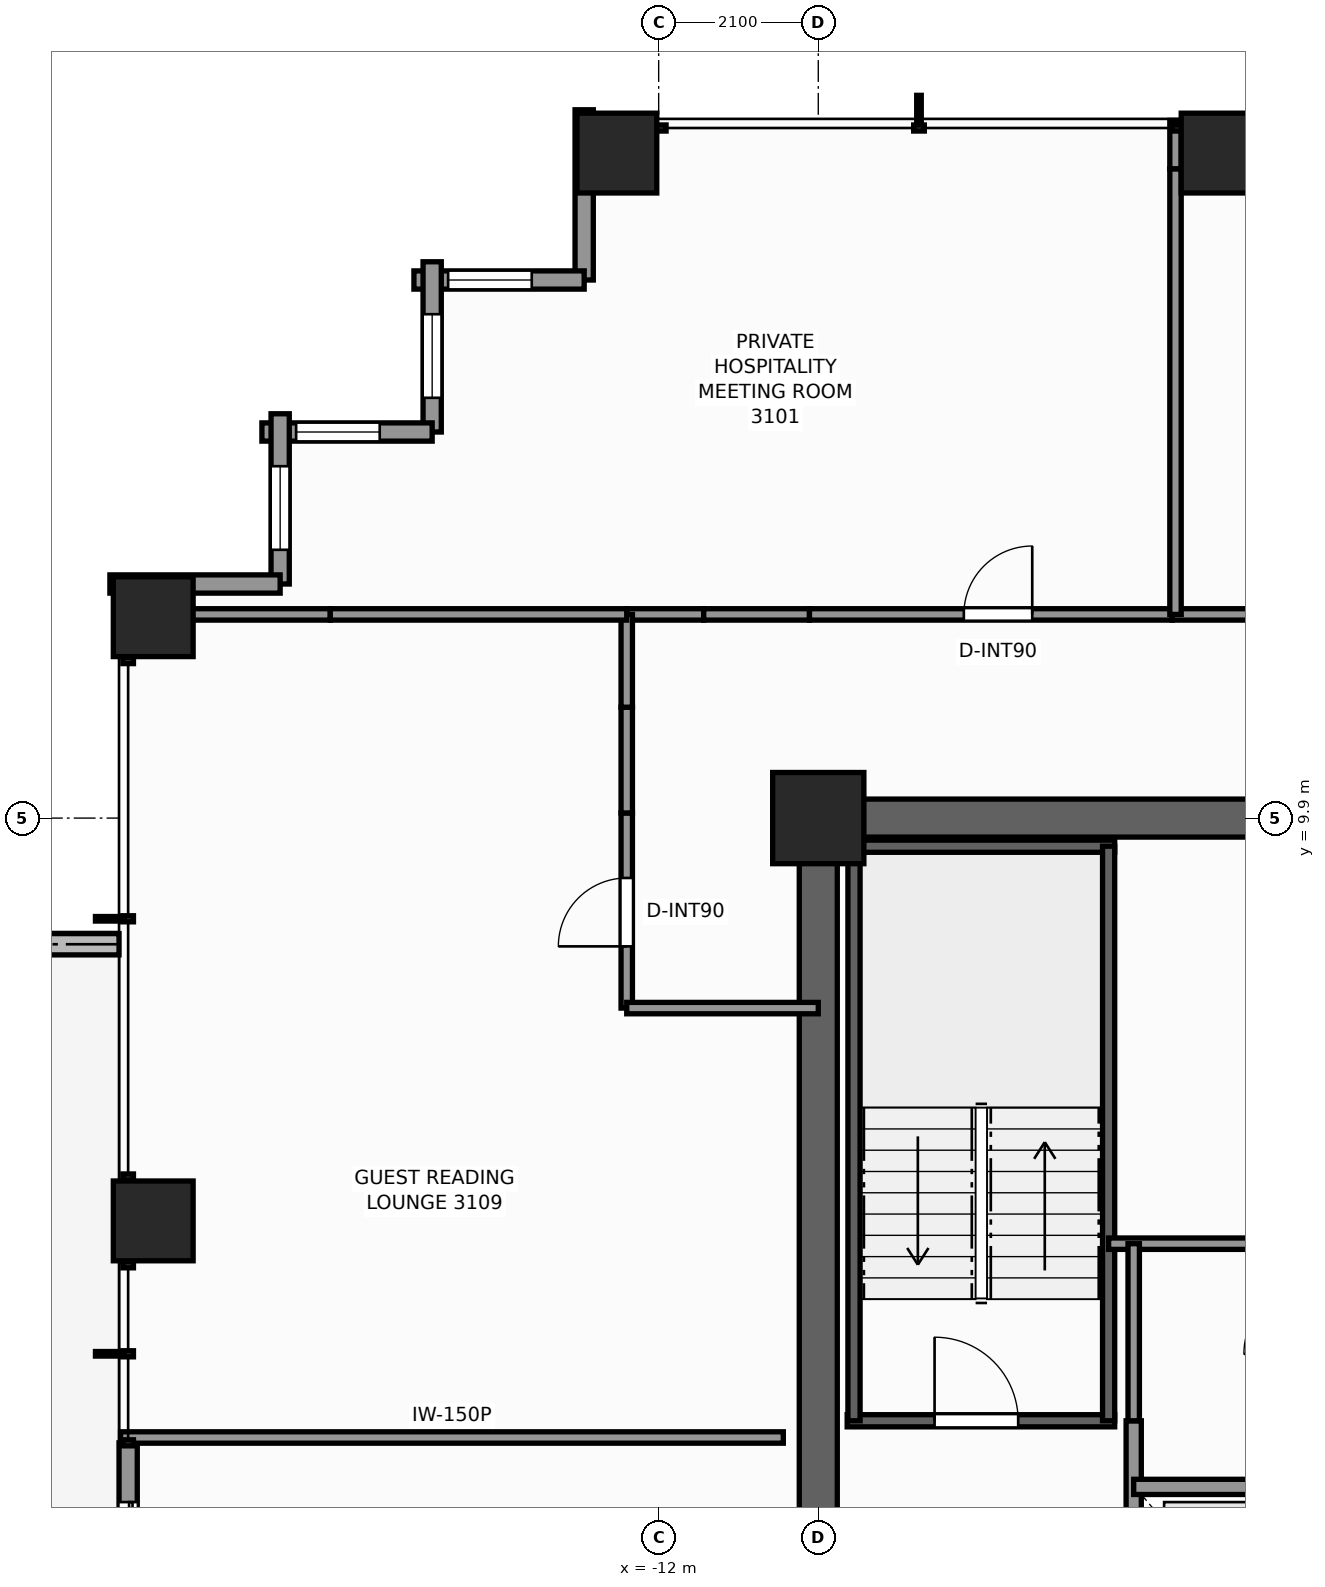
"""IFC4 building model, lengths in metres.
Left out: names, types, materials, properties, quantities, classifications, styles, units other than length and angle.
Written with IfcOpenShell. Run it as: python <this file> out.ifc"""

import sys

from ifc_helpers import new_model, si_unit, direction, frame, frame_2d, origin, origin_2d, place, context, subcontext, project, spatial, rectangle, extrude, element, fill, save


model = new_model("IFC4")
c1 = context("Model", 3, precision=1e-05, world=origin(), true_north=direction((0.0, 1.0)))
c2 = subcontext(c1, "Body", "Model", "MODEL_VIEW")
j1 = project(units=[si_unit("LENGTHUNIT", "METRE"), si_unit("PLANEANGLEUNIT", "RADIAN")], contexts=[c1])
p1 = place(None, origin())
s1 = spatial("IfcSite", under=j1, at=p1, CompositionType="ELEMENT")
p2 = place(p1, origin())
s2 = spatial("IfcBuilding", under=s1, at=p2, CompositionType="ELEMENT")
p3 = place(p2, frame((0.0, 0.0, 108.5)))
s3 = spatial("IfcBuildingStorey", under=s2, at=p3, CompositionType="ELEMENT", Elevation=108.5)
p4 = place(p3, frame((-10.15, 9.9, 0.0), z_axis=(0.0, 0.0, 1.0), x_axis=(1.0, 0.0, 0.0)))
e1 = element("IfcWall", 1, at=p4, inside=s3, PredefinedType="SHEAR", context=c2, shape_type="SweptSolid", body=[
    extrude(rectangle(XDim=14.57, YDim=0.5, at=frame_2d((7.285, 0.0))), origin(), (0.0, 0.0, 1.0), 3.3),
])
p5 = place(p3, frame((-9.9, -3.7, 0.0), z_axis=(0.0, 0.0, 1.0), x_axis=(0.0, 1.0, 0.0)))
e2 = element("IfcWall", 2, at=p5, inside=s3, PredefinedType="SHEAR", context=c2, shape_type="SweptSolid", body=[
    extrude(rectangle(XDim=13.35, YDim=0.5, at=frame_2d((6.675, 0.0))), origin(), (0.0, 0.0, 1.0), 3.3),
])
p6 = place(p5, frame((0.35, 0.0, 0.0)))
e3 = element("IfcOpeningElement", 3, at=p6, cuts=e2, PredefinedType="OPENING", context=c2, shape_type="SweptSolid", body=[
    extrude(rectangle(XDim=1.1, YDim=2.2, at=frame_2d((0.55, 1.1))), frame((0.0, 0.26, 0.0), z_axis=(0.0, -1.0, 0.0), x_axis=(1.0, 0.0, 0.0)), (0.0, 0.0, 1.0), 0.52),
])
p7 = place(p3, frame((-9.9, 9.9, 0.0), z_axis=(0.0, 0.0, 1.0), x_axis=(1.0, 0.0, 0.0)))
e4 = element("IfcColumn", 4, at=p7, inside=s3, PredefinedType="COLUMN", context=c2, shape_type="SweptSolid", body=[
    extrude(rectangle(XDim=1.2, YDim=1.2, at=origin_2d()), origin(), (0.0, 0.0, 1.0), 3.3),
])
for number, where, z_axis, x_axis in (
    (5, (-12.55, 18.65, 0.0), (0.0, 0.0, 1.0), (1.0, 0.0, 0.0)),
    (6, (-4.6, 18.65, 0.0), (0.0, 0.0, 1.0), (1.0, 0.0, 0.0)),
    (7, (-18.65, 4.6, 0.0), (0.0, 0.0, 1.0), (1.0, 0.0, 0.0)),
    (8, (-18.65, 12.55, 0.0), (0.0, 0.0, 1.0), (1.0, 0.0, 0.0)),
):
    element("IfcColumn", number, at=place(p3, frame(where, z_axis=z_axis, x_axis=x_axis)), inside=s3, PredefinedType="COLUMN", context=c2, shape_type="SweptSolid", body=[
        extrude(rectangle(XDim=1.05, YDim=1.05, at=origin_2d()), origin(), (0.0, 0.0, 1.0), 3.3),
    ])
p8 = place(p3, frame((-19.1, 8.24, -0.04), z_axis=(0.0, 0.0, 1.0), x_axis=(-1.0, 0.0, 0.0)))
e9 = element("IfcWall", 9, at=p8, inside=s3, PredefinedType="PARAPET", context=c2, shape_type="SweptSolid", body=[
    extrude(rectangle(XDim=1.26, YDim=0.28, at=frame_2d((0.63, 0.0))), origin(), (0.0, 0.0, 1.0), 0.42),
])
p9 = place(p3, frame((-12.98, 16.98, 0.0), z_axis=(0.0, 0.0, 1.0), x_axis=(0.0, 1.0, 0.0)))
e10 = element("IfcWall", 10, at=p9, inside=s3, PredefinedType="STANDARD", context=c2, shape_type="SweptSolid", body=[
    extrude(rectangle(XDim=2.24, YDim=0.24, at=frame_2d((1.12, 0.0))), origin(), (0.0, 0.0, 1.0), 1.275),
])
p10 = place(p3, frame((-15.22, 16.98, 0.0), z_axis=(0.0, 0.0, 1.0), x_axis=(1.0, 0.0, 0.0)))
e11 = element("IfcWall", 11, at=p10, inside=s3, PredefinedType="STANDARD", context=c2, shape_type="SweptSolid", body=[
    extrude(rectangle(XDim=2.24, YDim=0.24, at=frame_2d((1.12, 0.0))), origin(), (0.0, 0.0, 1.0), 2.459),
])
p11 = place(p10, frame((0.45, 0.0, 0.65)))
e12 = element("IfcOpeningElement", 12, at=p11, cuts=e11, PredefinedType="OPENING", context=c2, shape_type="SweptSolid", body=[
    extrude(rectangle(XDim=1.1, YDim=1.45, at=frame_2d((0.55, 0.725))), frame((0.0, 0.13, 0.0), z_axis=(0.0, -1.0, 0.0), x_axis=(1.0, 0.0, 0.0)), (0.0, 0.0, 1.0), 0.26),
])
p12 = place(p3, frame((-14.98, 14.98, 0.0), z_axis=(0.0, 0.0, 1.0), x_axis=(0.0, 1.0, 0.0)))
e13 = element("IfcWall", 13, at=p12, inside=s3, PredefinedType="STANDARD", context=c2, shape_type="SweptSolid", body=[
    extrude(rectangle(XDim=2.24, YDim=0.24, at=frame_2d((1.12, 0.0))), origin(), (0.0, 0.0, 1.0), 2.459),
])
p13 = place(p12, frame((0.45, 0.0, 0.65)))
e14 = element("IfcOpeningElement", 14, at=p13, cuts=e13, PredefinedType="OPENING", context=c2, shape_type="SweptSolid", body=[
    extrude(rectangle(XDim=1.1, YDim=1.45, at=frame_2d((0.55, 0.725))), frame((0.0, 0.13, 0.0), z_axis=(0.0, -1.0, 0.0), x_axis=(1.0, 0.0, 0.0)), (0.0, 0.0, 1.0), 0.26),
])
p14 = place(p3, frame((-17.22, 14.98, 0.0), z_axis=(0.0, 0.0, 1.0), x_axis=(1.0, 0.0, 0.0)))
e15 = element("IfcWall", 15, at=p14, inside=s3, PredefinedType="STANDARD", context=c2, shape_type="SweptSolid", body=[
    extrude(rectangle(XDim=2.24, YDim=0.24, at=frame_2d((1.12, 0.0))), origin(), (0.0, 0.0, 1.0), 2.459),
])
p15 = place(p14, frame((0.45, 0.0, 0.65)))
e16 = element("IfcOpeningElement", 16, at=p15, cuts=e15, PredefinedType="OPENING", context=c2, shape_type="SweptSolid", body=[
    extrude(rectangle(XDim=1.1, YDim=1.45, at=frame_2d((0.55, 0.725))), frame((0.0, 0.13, 0.0), z_axis=(0.0, -1.0, 0.0), x_axis=(1.0, 0.0, 0.0)), (0.0, 0.0, 1.0), 0.26),
])
p16 = place(p3, frame((-16.98, 12.98, 0.0), z_axis=(0.0, 0.0, 1.0), x_axis=(0.0, 1.0, 0.0)))
e17 = element("IfcWall", 17, at=p16, inside=s3, PredefinedType="STANDARD", context=c2, shape_type="SweptSolid", body=[
    extrude(rectangle(XDim=2.24, YDim=0.24, at=frame_2d((1.12, 0.0))), origin(), (0.0, 0.0, 1.0), 2.459),
])
p17 = place(p16, frame((0.45, 0.0, 0.65)))
e18 = element("IfcOpeningElement", 18, at=p17, cuts=e17, PredefinedType="OPENING", context=c2, shape_type="SweptSolid", body=[
    extrude(rectangle(XDim=1.1, YDim=1.45, at=frame_2d((0.55, 0.725))), frame((0.0, 0.13, 0.0), z_axis=(0.0, -1.0, 0.0), x_axis=(1.0, 0.0, 0.0)), (0.0, 0.0, 1.0), 0.26),
])
p18 = place(p3, frame((-19.22, 12.98, 0.0), z_axis=(0.0, 0.0, 1.0), x_axis=(1.0, 0.0, 0.0)))
e19 = element("IfcWall", 19, at=p18, inside=s3, PredefinedType="STANDARD", context=c2, shape_type="SweptSolid", body=[
    extrude(rectangle(XDim=2.24, YDim=0.24, at=frame_2d((1.12, 0.0))), origin(), (0.0, 0.0, 1.0), 1.275),
])
p19 = place(p3, frame((-18.98, -1.68, 0.0), z_axis=(0.0, 0.0, 1.0), x_axis=(0.0, 1.0, 0.0)))
e20 = element("IfcWall", 20, at=p19, inside=s3, PredefinedType="STANDARD", context=c2, shape_type="SweptSolid", body=[
    extrude(rectangle(XDim=3.36, YDim=0.24, at=frame_2d((1.68, 0.0))), origin(), (0.0, 0.0, 1.0), 3.08),
])
p20 = place(p19, frame((0.78, 0.0, 0.0)))
e21 = element("IfcOpeningElement", 21, at=p20, cuts=e20, PredefinedType="OPENING", context=c2, shape_type="SweptSolid", body=[
    extrude(rectangle(XDim=1.8, YDim=2.2, at=frame_2d((0.9, 1.1))), frame((0.0, 0.13, 0.0), z_axis=(0.0, -1.0, 0.0), x_axis=(1.0, 0.0, 0.0)), (0.0, 0.0, 1.0), 0.26),
])
p21 = place(p3, frame((-9.52, 1.97, 0.0), z_axis=(0.0, 0.0, 1.0), x_axis=(1.0, 0.0, 0.0)))
e22 = element("IfcWall", 22, at=p21, inside=s3, PredefinedType="SHEAR", context=c2, shape_type="SweptSolid", body=[
    extrude(rectangle(XDim=3.52, YDim=0.16, at=frame_2d((1.76, 0.0))), origin(), (0.0, 0.0, 1.0), 3.3),
])
p22 = place(p21, frame((1.15, 0.0, 0.0)))
e23 = element("IfcOpeningElement", 23, at=p22, cuts=e22, PredefinedType="OPENING", context=c2, shape_type="SweptSolid", body=[
    extrude(rectangle(XDim=1.1, YDim=2.2, at=frame_2d((0.55, 1.1))), frame((0.0, 0.09, 0.0), z_axis=(0.0, -1.0, 0.0), x_axis=(1.0, 0.0, 0.0)), (0.0, 0.0, 1.0), 0.18),
])
p23 = place(p3, frame((-9.52, 9.53, 0.0), z_axis=(0.0, 0.0, 1.0), x_axis=(1.0, 0.0, 0.0)))
e24 = element("IfcWall", 24, at=p23, inside=s3, PredefinedType="SHEAR", context=c2, shape_type="SweptSolid", body=[
    extrude(rectangle(XDim=3.52, YDim=0.16, at=frame_2d((1.76, 0.0))), origin(), (0.0, 0.0, 1.0), 3.3),
])
for number, where, z_axis, x_axis in (
    (25, (-9.43, 1.97, 0.0), (0.0, 0.0, 1.0), (0.0, 1.0, 0.0)),
    (26, (-6.08, 1.97, 0.0), (0.0, 0.0, 1.0), (0.0, 1.0, 0.0)),
):
    element("IfcWall", number, at=place(p3, frame(where, z_axis=z_axis, x_axis=x_axis)), inside=s3, PredefinedType="SHEAR", context=c2, shape_type="SweptSolid", body=[
        extrude(rectangle(XDim=7.56, YDim=0.16, at=frame_2d((3.78, 0.0))), origin(), (0.0, 0.0, 1.0), 3.3),
    ])
p24 = place(p3, frame((-5.75, -3.6, 0.0), z_axis=(0.0, 0.0, 1.0), x_axis=(0.0, 1.0, 0.0)))
e27 = element("IfcWall", 27, at=p24, inside=s3, PredefinedType="SOLIDWALL", context=c2, shape_type="SweptSolid", body=[
    extrude(rectangle(XDim=5.57, YDim=0.2, at=frame_2d((2.785, 0.0))), origin(), (0.0, 0.0, 1.0), 2.715),
])
p25 = place(p24, frame((2.75, 0.0, 0.0)))
e28 = element("IfcOpeningElement", 28, at=p25, cuts=e27, PredefinedType="OPENING", context=c2, shape_type="SweptSolid", body=[
    extrude(rectangle(XDim=1.1, YDim=2.2, at=frame_2d((0.55, 1.1))), frame((0.0, 0.11, 0.0), z_axis=(0.0, -1.0, 0.0), x_axis=(1.0, 0.0, 0.0)), (0.0, 0.0, 1.0), 0.22),
])
p26 = place(p3, frame((-5.75, 1.1, 0.0), z_axis=(0.0, 0.0, 1.0), x_axis=(1.0, 0.0, 0.0)))
e29 = element("IfcWall", 29, at=p26, inside=s3, PredefinedType="SOLIDWALL", context=c2, shape_type="SweptSolid", body=[
    extrude(rectangle(XDim=2.4, YDim=0.2, at=frame_2d((1.2, 0.0))), origin(), (0.0, 0.0, 1.0), 3.08),
])
p27 = place(p3, frame((-6.08, 4.3, 0.0), z_axis=(0.0, 0.0, 1.0), x_axis=(1.0, 0.0, 0.0)))
e30 = element("IfcWall", 30, at=p27, inside=s3, PredefinedType="PARTITIONING", context=c2, shape_type="SweptSolid", body=[
    extrude(rectangle(XDim=6.3, YDim=0.15, at=frame_2d((3.15, 0.0))), origin(), (0.0, 0.0, 1.0), 3.08),
])
p28 = place(p3, frame((-5.75, 1.97, 0.0), z_axis=(0.0, 0.0, 1.0), x_axis=(0.0, 1.0, 0.0)))
e31 = element("IfcWall", 31, at=p28, inside=s3, PredefinedType="PARTITIONING", context=c2, shape_type="SweptSolid", body=[
    extrude(rectangle(XDim=2.33, YDim=0.15, at=frame_2d((1.165, 0.0))), origin(), (0.0, 0.0, 1.0), 2.715),
])
p29 = place(p3, frame((-12.42, 12.58, 0.0), z_axis=(0.0, 0.0, 1.0), x_axis=(1.0, 0.0, 0.0)))
e32 = element("IfcWall", 32, at=p29, inside=s3, PredefinedType="PARTITIONING", context=c2, shape_type="SweptSolid", body=[
    extrude(rectangle(XDim=1.012, YDim=0.15, at=frame_2d((0.506, 0.0))), origin(), (0.0, 0.0, 1.0), 3.08),
])
p30 = place(p3, frame((-11.407, 12.58, 0.0), z_axis=(0.0, 0.0, 1.0), x_axis=(1.0, 0.0, 0.0)))
e33 = element("IfcWall", 33, at=p30, inside=s3, PredefinedType="PARTITIONING", context=c2, shape_type="SweptSolid", body=[
    extrude(rectangle(XDim=1.392, YDim=0.15, at=frame_2d((0.696, 0.0))), origin(), (0.0, 0.0, 1.0), 1.265),
])
p31 = place(p3, frame((-10.016, 12.58, 0.0), z_axis=(0.0, 0.0, 1.0), x_axis=(1.0, 0.0, 0.0)))
e34 = element("IfcWall", 34, at=p31, inside=s3, PredefinedType="PARTITIONING", context=c2, shape_type="SweptSolid", body=[
    extrude(rectangle(XDim=4.774, YDim=0.15, at=frame_2d((2.387, 0.0))), origin(), (0.0, 0.0, 1.0), 3.08),
])
p32 = place(p31, frame((2.031, 0.0, 0.0)))
e35 = element("IfcOpeningElement", 35, at=p32, cuts=e34, PredefinedType="OPENING", context=c2, shape_type="SweptSolid", body=[
    extrude(rectangle(XDim=0.9, YDim=2.06, at=frame_2d((0.45, 1.03))), frame((0.0, 0.085, 0.0), z_axis=(0.0, -1.0, 0.0), x_axis=(1.0, 0.0, 0.0)), (0.0, 0.0, 1.0), 0.17),
])
p33 = place(p3, frame((-5.242, 12.58, 0.0), z_axis=(0.0, 0.0, 1.0), x_axis=(1.0, 0.0, 0.0)))
e36 = element("IfcWall", 36, at=p33, inside=s3, PredefinedType="PARTITIONING", context=c2, shape_type="SweptSolid", body=[
    extrude(rectangle(XDim=1.284, YDim=0.15, at=frame_2d((0.642, 0.0))), origin(), (0.0, 0.0, 1.0), 1.265),
])
p34 = place(p3, frame((-12.42, 7.4, 0.0), z_axis=(0.0, 0.0, 1.0), x_axis=(0.0, 1.0, 0.0)))
e37 = element("IfcWall", 37, at=p34, inside=s3, PredefinedType="PARTITIONING", context=c2, shape_type="SweptSolid", body=[
    extrude(rectangle(XDim=2.567, YDim=0.15, at=frame_2d((1.284, 0.0))), origin(), (0.0, 0.0, 1.0), 3.08),
])
p35 = place(p34, frame((0.812, 0.0, 0.0)))
e38 = element("IfcOpeningElement", 38, at=p35, cuts=e37, PredefinedType="OPENING", context=c2, shape_type="SweptSolid", body=[
    extrude(rectangle(XDim=0.9, YDim=2.06, at=frame_2d((0.45, 1.03))), frame((0.0, 0.085, 0.0), z_axis=(0.0, -1.0, 0.0), x_axis=(1.0, 0.0, 0.0)), (0.0, 0.0, 1.0), 0.17),
])
p36 = place(p3, frame((-12.42, 9.967, 0.0), z_axis=(0.0, 0.0, 1.0), x_axis=(0.0, 1.0, 0.0)))
e39 = element("IfcWall", 39, at=p36, inside=s3, PredefinedType="PARTITIONING", context=c2, shape_type="SweptSolid", body=[
    extrude(rectangle(XDim=1.392, YDim=0.15, at=frame_2d((0.696, 0.0))), origin(), (0.0, 0.0, 1.0), 1.265),
])
p37 = place(p3, frame((-12.42, 11.359, 0.0), z_axis=(0.0, 0.0, 1.0), x_axis=(0.0, 1.0, 0.0)))
e40 = element("IfcWall", 40, at=p37, inside=s3, PredefinedType="PARTITIONING", context=c2, shape_type="SweptSolid", body=[
    extrude(rectangle(XDim=1.221, YDim=0.15, at=frame_2d((0.611, 0.0))), origin(), (0.0, 0.0, 1.0), 3.08),
])
p38 = place(p3, frame((-12.42, 7.4, 0.0), z_axis=(0.0, 0.0, 1.0), x_axis=(1.0, 0.0, 0.0)))
e41 = element("IfcWall", 41, at=p38, inside=s3, PredefinedType="PARTITIONING", context=c2, shape_type="SweptSolid", body=[
    extrude(rectangle(XDim=2.52, YDim=0.15, at=frame_2d((1.26, 0.0))), origin(), (0.0, 0.0, 1.0), 3.08),
])
p39 = place(p3, frame((-19.08, 12.58, 0.0), z_axis=(0.0, 0.0, 1.0), x_axis=(1.0, 0.0, 0.0)))
e42 = element("IfcWall", 42, at=p39, inside=s3, PredefinedType="PARTITIONING", context=c2, shape_type="SweptSolid", body=[
    extrude(rectangle(XDim=0.602, YDim=0.15, at=frame_2d((0.301, 0.0))), origin(), (0.0, 0.0, 1.0), 3.08),
])
p40 = place(p3, frame((-18.478, 12.58, 0.0), z_axis=(0.0, 0.0, 1.0), x_axis=(1.0, 0.0, 0.0)))
e43 = element("IfcWall", 43, at=p40, inside=s3, PredefinedType="PARTITIONING", context=c2, shape_type="SweptSolid", body=[
    extrude(rectangle(XDim=2.157, YDim=0.15, at=frame_2d((1.079, 0.0))), origin(), (0.0, 0.0, 1.0), 1.265),
])
p41 = place(p3, frame((-16.321, 12.58, 0.0), z_axis=(0.0, 0.0, 1.0), x_axis=(1.0, 0.0, 0.0)))
e44 = element("IfcWall", 44, at=p41, inside=s3, PredefinedType="PARTITIONING", context=c2, shape_type="SweptSolid", body=[
    extrude(rectangle(XDim=3.901, YDim=0.15, at=frame_2d((1.95, 0.0))), origin(), (0.0, 0.0, 1.0), 3.08),
])
p42 = place(p3, frame((-5.2, 12.58, 0.0), z_axis=(0.0, 0.0, 1.0), x_axis=(0.0, 1.0, 0.0)))
e45 = element("IfcWall", 45, at=p42, inside=s3, PredefinedType="PARTITIONING", context=c2, shape_type="SweptSolid", body=[
    extrude(rectangle(XDim=5.864, YDim=0.15, at=frame_2d((2.932, 0.0))), origin(), (0.0, 0.0, 1.0), 1.265),
])
p43 = place(p3, frame((-5.2, 18.444, 0.0), z_axis=(0.0, 0.0, 1.0), x_axis=(0.0, 1.0, 0.0)))
e46 = element("IfcWall", 46, at=p43, inside=s3, PredefinedType="PARTITIONING", context=c2, shape_type="SweptSolid", body=[
    extrude(rectangle(XDim=0.636, YDim=0.15, at=frame_2d((0.318, 0.0))), origin(), (0.0, 0.0, 1.0), 2.449),
])
p44 = place(p3, frame((-19.08, 1.75, 0.0), z_axis=(0.0, 0.0, 1.0), x_axis=(1.0, 0.0, 0.0)))
e47 = element("IfcWall", 47, at=p44, inside=s3, PredefinedType="PARTITIONING", context=c2, shape_type="SweptSolid", body=[
    extrude(rectangle(XDim=8.72, YDim=0.15, at=frame_2d((4.36, 0.0))), origin(), (0.0, 0.0, 1.0), 2.449),
])
p45 = place(p11, origin())
e48 = element("IfcWindow", 48, at=p45, inside=s3, PartitioningType="SINGLE_PANEL", PredefinedType="WINDOW", context=c2, shape_type="SweptSolid", body=[
    extrude(rectangle(XDim=1.1, YDim=1.45, at=frame_2d((0.55, 0.725))), frame((0.0, 0.03, 0.0), z_axis=(0.0, -1.0, 0.0), x_axis=(1.0, 0.0, 0.0)), (0.0, 0.0, 1.0), 0.06),
])
fill(e12, e48)
p46 = place(p13, origin())
e49 = element("IfcWindow", 49, at=p46, inside=s3, PartitioningType="SINGLE_PANEL", PredefinedType="WINDOW", context=c2, shape_type="SweptSolid", body=[
    extrude(rectangle(XDim=1.1, YDim=1.45, at=frame_2d((0.55, 0.725))), frame((0.0, 0.03, 0.0), z_axis=(0.0, -1.0, 0.0), x_axis=(1.0, 0.0, 0.0)), (0.0, 0.0, 1.0), 0.06),
])
fill(e14, e49)
p47 = place(p15, origin())
e50 = element("IfcWindow", 50, at=p47, inside=s3, PartitioningType="SINGLE_PANEL", PredefinedType="WINDOW", context=c2, shape_type="SweptSolid", body=[
    extrude(rectangle(XDim=1.1, YDim=1.45, at=frame_2d((0.55, 0.725))), frame((0.0, 0.03, 0.0), z_axis=(0.0, -1.0, 0.0), x_axis=(1.0, 0.0, 0.0)), (0.0, 0.0, 1.0), 0.06),
])
fill(e16, e50)
p48 = place(p17, origin())
e51 = element("IfcWindow", 51, at=p48, inside=s3, PartitioningType="SINGLE_PANEL", PredefinedType="WINDOW", context=c2, shape_type="SweptSolid", body=[
    extrude(rectangle(XDim=1.1, YDim=1.45, at=frame_2d((0.55, 0.725))), frame((0.0, 0.03, 0.0), z_axis=(0.0, -1.0, 0.0), x_axis=(1.0, 0.0, 0.0)), (0.0, 0.0, 1.0), 0.06),
])
fill(e18, e51)
p49 = place(p20, origin())
e52 = element("IfcDoor", 52, at=p49, inside=s3, OperationType="DOUBLE_DOOR_SLIDING", PredefinedType="DOOR", context=c2, shape_type="SweptSolid", body=[
    extrude(rectangle(XDim=1.8, YDim=2.2, at=frame_2d((0.9, 1.1))), frame((0.0, 0.025, 0.0), z_axis=(0.0, -1.0, 0.0), x_axis=(1.0, 0.0, 0.0)), (0.0, 0.0, 1.0), 0.05),
])
fill(e21, e52)
p50 = place(p22, origin())
e53 = element("IfcDoor", 53, at=p50, inside=s3, OperationType="SINGLE_SWING_LEFT", PredefinedType="DOOR", context=c2, shape_type="SweptSolid", body=[
    extrude(rectangle(XDim=1.1, YDim=2.2, at=frame_2d((0.55, 1.1))), frame((0.0, 0.025, 0.0), z_axis=(0.0, -1.0, 0.0), x_axis=(1.0, 0.0, 0.0)), (0.0, 0.0, 1.0), 0.05),
])
fill(e23, e53)
p51 = place(p32, origin())
e54 = element("IfcDoor", 54, at=p51, inside=s3, OperationType="SINGLE_SWING_RIGHT", PredefinedType="DOOR", context=c2, shape_type="SweptSolid", body=[
    extrude(rectangle(XDim=0.9, YDim=2.06, at=frame_2d((0.45, 1.03))), frame((0.0, 0.025, 0.0), z_axis=(0.0, -1.0, 0.0), x_axis=(1.0, 0.0, 0.0)), (0.0, 0.0, 1.0), 0.05),
])
fill(e35, e54)
p52 = place(p35, origin())
e55 = element("IfcDoor", 55, at=p52, inside=s3, OperationType="SINGLE_SWING_LEFT", PredefinedType="DOOR", context=c2, shape_type="SweptSolid", body=[
    extrude(rectangle(XDim=0.9, YDim=2.06, at=frame_2d((0.45, 1.03))), frame((0.0, 0.025, 0.0), z_axis=(0.0, -1.0, 0.0), x_axis=(1.0, 0.0, 0.0)), (0.0, 0.0, 1.0), 0.05),
])
fill(e38, e55)
save(model, sys.argv[1])
